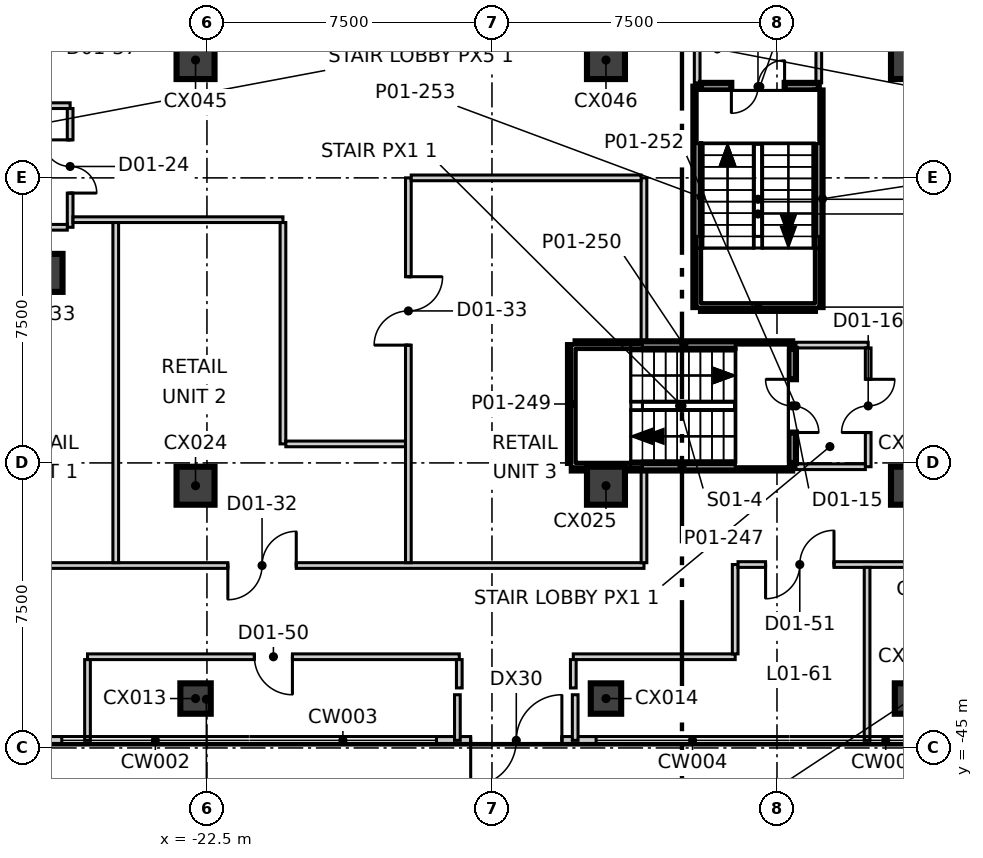
"""IFC4 building model, lengths in metres.
Left out: names, types, materials, properties, quantities, classifications, styles, units other than length and angle.
Written with IfcOpenShell. Run it as: python <this file> out.ifc"""

import sys

from ifc_helpers import new_model, si_unit, direction, frame, frame_2d, origin, origin_2d, place, context, subcontext, project, spatial, rectangle, extrude, element, fill, save


model = new_model("IFC4")
c1 = context("Model", 3, precision=1e-05, world=origin(), true_north=direction((0.0, 1.0)))
c2 = subcontext(c1, "Body", "Model", "MODEL_VIEW")
j1 = project(units=[si_unit("LENGTHUNIT", "METRE"), si_unit("PLANEANGLEUNIT", "RADIAN")], contexts=[c1])
p1 = place(None, origin())
s1 = spatial("IfcSite", under=j1, at=p1, CompositionType="ELEMENT")
p2 = place(p1, origin())
s2 = spatial("IfcBuilding", under=s1, at=p2, CompositionType="ELEMENT")
p3 = place(p2, frame((0.0, 0.0, 8.5)))
s3 = spatial("IfcBuildingStorey", under=s2, at=p3, CompositionType="ELEMENT", Elevation=8.5)
for number, where, z_axis, x_axis in (
    (1, (-22.8, -43.7, -0.4), (0.0, 0.0, 1.0), (1.0, 0.0, 0.0)),
    (2, (-12.0, -43.7, -0.4), (0.0, 0.0, 1.0), (1.0, 0.0, 0.0)),
    (3, (-4.0, -43.7, -0.4), (0.0, 0.0, 1.0), (1.0, 0.0, 0.0)),
):
    element("IfcColumn", number, at=place(p3, frame(where, z_axis=z_axis, x_axis=x_axis)), inside=s3, PredefinedType="COLUMN", context=c2, shape_type="SweptSolid", body=[
        extrude(rectangle(XDim=0.8, YDim=0.8, at=origin_2d()), origin(), (0.0, 0.0, 1.0), 6.0),
    ])
for number, where, z_axis, x_axis in (
    (4, (-22.8, -38.1, -0.4), (0.0, 0.0, 1.0), (1.0, 0.0, 0.0)),
    (5, (-12.0, -38.1, -0.4), (0.0, 0.0, 1.0), (1.0, 0.0, 0.0)),
    (6, (-4.0, -38.1, -0.4), (0.0, 0.0, 1.0), (1.0, 0.0, 0.0)),
    (7, (-26.8, -32.5, -0.4), (0.0, 0.0, 1.0), (1.0, 0.0, 0.0)),
    (8, (-22.8, -26.9, -0.4), (0.0, 0.0, 1.0), (1.0, 0.0, 0.0)),
    (9, (-12.0, -26.9, -0.4), (0.0, 0.0, 1.0), (1.0, 0.0, 0.0)),
    (10, (-4.0, -26.9, -0.4), (0.0, 0.0, 1.0), (1.0, 0.0, 0.0)),
):
    element("IfcColumn", number, at=place(p3, frame(where, z_axis=z_axis, x_axis=x_axis)), inside=s3, PredefinedType="COLUMN", context=c2, shape_type="SweptSolid", body=[
        extrude(rectangle(XDim=1.0, YDim=1.0, at=origin_2d()), origin(), (0.0, 0.0, 1.0), 6.0),
    ])
p4 = place(p3, frame((-30.52, -44.8, 0.0), z_axis=(0.0, 0.0, 1.0), x_axis=(1.0, 0.0, 0.0)))
e11 = element("IfcWall", 11, at=p4, inside=s3, PredefinedType="ELEMENTEDWALL", context=c2, shape_type="SweptSolid", body=[
    extrude(rectangle(XDim=4.2, YDim=0.2, at=frame_2d((2.1, 0.0))), origin(), (0.0, 0.0, 1.0), 5.6),
])
p5 = place(p4, frame((0.9, 0.0, 0.0)))
e12 = element("IfcOpeningElement", 12, at=p5, cuts=e11, PredefinedType="OPENING", context=c2, shape_type="SweptSolid", body=[
    extrude(rectangle(XDim=2.4, YDim=2.4, at=frame_2d((1.2, 1.2))), frame((0.0, 0.11, 0.0), z_axis=(0.0, -1.0, 0.0), x_axis=(1.0, 0.0, 0.0)), (0.0, 0.0, 1.0), 0.22),
])
p6 = place(p3, frame((-16.46, -44.8, 0.0), z_axis=(0.0, 0.0, 1.0), x_axis=(1.0, 0.0, 0.0)))
e13 = element("IfcWall", 13, at=p6, inside=s3, PredefinedType="ELEMENTEDWALL", context=c2, shape_type="SweptSolid", body=[
    extrude(rectangle(XDim=4.2, YDim=0.2, at=frame_2d((2.1, 0.0))), origin(), (0.0, 0.0, 1.0), 5.6),
])
p7 = place(p6, frame((0.9, 0.0, 0.0)))
e14 = element("IfcOpeningElement", 14, at=p7, cuts=e13, PredefinedType="OPENING", context=c2, shape_type="SweptSolid", body=[
    extrude(rectangle(XDim=2.4, YDim=2.4, at=frame_2d((1.2, 1.2))), frame((0.0, 0.11, 0.0), z_axis=(0.0, -1.0, 0.0), x_axis=(1.0, 0.0, 0.0)), (0.0, 0.0, 1.0), 0.22),
])
p8 = place(p3, frame((-28.0, -28.1, 0.0), z_axis=(0.0, 0.0, 1.0), x_axis=(1.0, 0.0, 0.0)))
e15 = element("IfcWall", 15, at=p8, inside=s3, PredefinedType="PARTITIONING", context=c2, shape_type="SweptSolid", body=[
    extrude(rectangle(XDim=1.9, YDim=0.15, at=frame_2d((0.95, 0.0))), origin(), (0.0, 0.0, 1.0), 5.6),
])
p9 = place(p3, frame((-26.1, -31.3, 0.0), z_axis=(0.0, 0.0, 1.0), x_axis=(0.0, 1.0, 0.0)))
e16 = element("IfcWall", 16, at=p9, inside=s3, PredefinedType="PARTITIONING", context=c2, shape_type="SweptSolid", body=[
    extrude(rectangle(XDim=3.125, YDim=0.15, at=frame_2d((1.562, 0.0))), origin(), (0.0, 0.0, 1.0), 5.6),
])
p10 = place(p9, frame((0.9, 0.0, 0.0)))
e17 = element("IfcOpeningElement", 17, at=p10, cuts=e16, PredefinedType="OPENING", context=c2, shape_type="SweptSolid", body=[
    extrude(rectangle(XDim=1.4, YDim=2.1, at=frame_2d((0.7, 1.05))), frame((0.0, 0.085, 0.0), z_axis=(0.0, -1.0, 0.0), x_axis=(1.0, 0.0, 0.0)), (0.0, 0.0, 1.0), 0.17),
])
p11 = place(p3, frame((-28.0, -31.3, 0.0), z_axis=(0.0, 0.0, 1.0), x_axis=(1.0, 0.0, 0.0)))
e18 = element("IfcWall", 18, at=p11, inside=s3, PredefinedType="PARTITIONING", context=c2, shape_type="SweptSolid", body=[
    extrude(rectangle(XDim=1.825, YDim=0.15, at=frame_2d((0.913, 0.0))), origin(), (0.0, 0.0, 1.0), 5.6),
])
p12 = place(p3, frame((-9.6, -27.5, 0.0), z_axis=(0.0, 0.0, 1.0), x_axis=(0.0, 1.0, 0.0)))
e19 = element("IfcWall", 19, at=p12, inside=s3, PredefinedType="PARTITIONING", context=c2, shape_type="SweptSolid", body=[
    extrude(rectangle(XDim=1.9, YDim=0.15, at=frame_2d((0.95, 0.0))), origin(), (0.0, 0.0, 1.0), 5.6),
])
p13 = place(p3, frame((-6.4, -27.5, 0.0), z_axis=(0.0, 0.0, 1.0), x_axis=(0.0, 1.0, 0.0)))
e20 = element("IfcWall", 20, at=p13, inside=s3, PredefinedType="PARTITIONING", context=c2, shape_type="SweptSolid", body=[
    extrude(rectangle(XDim=1.825, YDim=0.15, at=frame_2d((0.913, 0.0))), origin(), (0.0, 0.0, 1.0), 5.6),
])
p14 = place(p3, frame((-7.0, -34.4, 0.0), z_axis=(0.0, 0.0, 1.0), x_axis=(1.0, 0.0, 0.0)))
e21 = element("IfcWall", 21, at=p14, inside=s3, PredefinedType="PARTITIONING", context=c2, shape_type="SweptSolid", body=[
    extrude(rectangle(XDim=1.9, YDim=0.15, at=frame_2d((0.95, 0.0))), origin(), (0.0, 0.0, 1.0), 5.6),
])
p15 = place(p3, frame((-5.1, -37.6, 0.0), z_axis=(0.0, 0.0, 1.0), x_axis=(0.0, 1.0, 0.0)))
e22 = element("IfcWall", 22, at=p15, inside=s3, PredefinedType="PARTITIONING", context=c2, shape_type="SweptSolid", body=[
    extrude(rectangle(XDim=3.125, YDim=0.15, at=frame_2d((1.562, 0.0))), origin(), (0.0, 0.0, 1.0), 5.6),
])
p16 = place(p15, frame((0.9, 0.0, 0.0)))
e23 = element("IfcOpeningElement", 23, at=p16, cuts=e22, PredefinedType="OPENING", context=c2, shape_type="SweptSolid", body=[
    extrude(rectangle(XDim=1.4, YDim=2.1, at=frame_2d((0.7, 1.05))), frame((0.0, 0.085, 0.0), z_axis=(0.0, -1.0, 0.0), x_axis=(1.0, 0.0, 0.0)), (0.0, 0.0, 1.0), 0.17),
])
p17 = place(p3, frame((-7.0, -37.6, 0.0), z_axis=(0.0, 0.0, 1.0), x_axis=(1.0, 0.0, 0.0)))
e24 = element("IfcWall", 24, at=p17, inside=s3, PredefinedType="PARTITIONING", context=c2, shape_type="SweptSolid", body=[
    extrude(rectangle(XDim=1.825, YDim=0.15, at=frame_2d((0.913, 0.0))), origin(), (0.0, 0.0, 1.0), 5.6),
])
p18 = place(p3, frame((-25.643, -42.6, 0.0), z_axis=(0.0, 0.0, 1.0), x_axis=(1.0, 0.0, 0.0)))
e25 = element("IfcWall", 25, at=p18, inside=s3, PredefinedType="PARTITIONING", context=c2, shape_type="SweptSolid", body=[
    extrude(rectangle(XDim=9.783, YDim=0.15, at=frame_2d((4.892, 0.0))), origin(), (0.0, 0.0, 1.0), 5.6),
])
p19 = place(p18, frame((4.392, 0.0, 0.0)))
e26 = element("IfcOpeningElement", 26, at=p19, cuts=e25, PredefinedType="OPENING", context=c2, shape_type="SweptSolid", body=[
    extrude(rectangle(XDim=1.0, YDim=2.1, at=frame_2d((0.5, 1.05))), frame((0.0, 0.085, 0.0), z_axis=(0.0, -1.0, 0.0), x_axis=(1.0, 0.0, 0.0)), (0.0, 0.0, 1.0), 0.17),
])
p20 = place(p3, frame((-12.86, -42.6, 0.0), z_axis=(0.0, 0.0, 1.0), x_axis=(1.0, 0.0, 0.0)))
e27 = element("IfcWall", 27, at=p20, inside=s3, PredefinedType="PARTITIONING", context=c2, shape_type="SweptSolid", body=[
    extrude(rectangle(XDim=4.26, YDim=0.15, at=frame_2d((2.13, 0.0))), origin(), (0.0, 0.0, 1.0), 5.6),
])
p21 = place(p3, frame((-31.3, -40.2, 0.0), z_axis=(0.0, 0.0, 1.0), x_axis=(1.0, 0.0, 0.0)))
e28 = element("IfcWall", 28, at=p21, inside=s3, PredefinedType="PARTITIONING", context=c2, shape_type="SweptSolid", body=[
    extrude(rectangle(XDim=20.3, YDim=0.15, at=frame_2d((10.15, 0.0))), origin(), (0.0, 0.0, 1.0), 5.6),
])
p22 = place(p21, frame((9.35, 0.0, 0.0)))
e29 = element("IfcOpeningElement", 29, at=p22, cuts=e28, PredefinedType="OPENING", context=c2, shape_type="SweptSolid", body=[
    extrude(rectangle(XDim=1.8, YDim=2.1, at=frame_2d((0.9, 1.05))), frame((0.0, 0.085, 0.0), z_axis=(0.0, -1.0, 0.0), x_axis=(1.0, 0.0, 0.0)), (0.0, 0.0, 1.0), 0.17),
])
p23 = place(p3, frame((-26.025, -31.1, 0.0), z_axis=(0.0, 0.0, 1.0), x_axis=(1.0, 0.0, 0.0)))
e30 = element("IfcWall", 30, at=p23, inside=s3, PredefinedType="PARTITIONING", context=c2, shape_type="SweptSolid", body=[
    extrude(rectangle(XDim=5.525, YDim=0.15, at=frame_2d((2.762, 0.0))), origin(), (0.0, 0.0, 1.0), 5.6),
])
p24 = place(p3, frame((-25.643, -44.8, 0.0), z_axis=(0.0, 0.0, 1.0), x_axis=(0.0, 1.0, 0.0)))
e31 = element("IfcWall", 31, at=p24, inside=s3, PredefinedType="PARTITIONING", context=c2, shape_type="SweptSolid", body=[
    extrude(rectangle(XDim=2.125, YDim=0.15, at=frame_2d((1.062, 0.0))), origin(), (0.0, 0.0, 1.0), 5.6),
])
p25 = place(p3, frame((-15.86, -43.421, 0.0), z_axis=(0.0, 0.0, 1.0), x_axis=(0.0, 1.0, 0.0)))
e32 = element("IfcWall", 32, at=p25, inside=s3, PredefinedType="PARTITIONING", context=c2, shape_type="SweptSolid", body=[
    extrude(rectangle(XDim=0.746, YDim=0.15, at=frame_2d((0.373, 0.0))), origin(), (0.0, 0.0, 1.0), 5.6),
])
p26 = place(p3, frame((-15.91, -44.8, 0.0), z_axis=(0.0, 0.0, 1.0), x_axis=(0.0, 1.0, 0.0)))
e33 = element("IfcWall", 33, at=p26, inside=s3, PredefinedType="PARTITIONING", context=c2, shape_type="SweptSolid", body=[
    extrude(rectangle(XDim=1.2, YDim=0.15, at=frame_2d((0.6, 0.0))), origin(), (0.0, 0.0, 1.0), 5.6),
])
p27 = place(p3, frame((-24.9, -40.125, 0.0), z_axis=(0.0, 0.0, 1.0), x_axis=(0.0, 1.0, 0.0)))
e34 = element("IfcWall", 34, at=p27, inside=s3, PredefinedType="PARTITIONING", context=c2, shape_type="SweptSolid", body=[
    extrude(rectangle(XDim=8.95, YDim=0.15, at=frame_2d((4.475, 0.0))), origin(), (0.0, 0.0, 1.0), 5.6),
])
p28 = place(p3, frame((-20.5, -37.0, 0.0), z_axis=(0.0, 0.0, 1.0), x_axis=(0.0, 1.0, 0.0)))
e35 = element("IfcWall", 35, at=p28, inside=s3, PredefinedType="PARTITIONING", context=c2, shape_type="SweptSolid", body=[
    extrude(rectangle(XDim=5.825, YDim=0.15, at=frame_2d((2.913, 0.0))), origin(), (0.0, 0.0, 1.0), 5.6),
])
p29 = place(p3, frame((-20.425, -37.0, 0.0), z_axis=(0.0, 0.0, 1.0), x_axis=(1.0, 0.0, 0.0)))
e36 = element("IfcWall", 36, at=p29, inside=s3, PredefinedType="PARTITIONING", context=c2, shape_type="SweptSolid", body=[
    extrude(rectangle(XDim=3.15, YDim=0.15, at=frame_2d((1.575, 0.0))), origin(), (0.0, 0.0, 1.0), 5.6),
])
p30 = place(p3, frame((-11.0, -40.125, 0.0), z_axis=(0.0, 0.0, 1.0), x_axis=(0.0, 1.0, 0.0)))
e37 = element("IfcWall", 37, at=p30, inside=s3, PredefinedType="PARTITIONING", context=c2, shape_type="SweptSolid", body=[
    extrude(rectangle(XDim=2.425, YDim=0.15, at=frame_2d((1.212, 0.0))), origin(), (0.0, 0.0, 1.0), 5.6),
])
p31 = place(p3, frame((-11.0, -34.3, 0.0), z_axis=(0.0, 0.0, 1.0), x_axis=(0.0, 1.0, 0.0)))
e38 = element("IfcWall", 38, at=p31, inside=s3, PredefinedType="PARTITIONING", context=c2, shape_type="SweptSolid", body=[
    extrude(rectangle(XDim=4.3, YDim=0.15, at=frame_2d((2.15, 0.0))), origin(), (0.0, 0.0, 1.0), 5.6),
])
p32 = place(p3, frame((-17.2, -40.125, 0.0), z_axis=(0.0, 0.0, 1.0), x_axis=(0.0, 1.0, 0.0)))
e39 = element("IfcWall", 39, at=p32, inside=s3, PredefinedType="PARTITIONING", context=c2, shape_type="SweptSolid", body=[
    extrude(rectangle(XDim=10.125, YDim=0.15, at=frame_2d((5.062, 0.0))), origin(), (0.0, 0.0, 1.0), 5.6),
])
p33 = place(p32, frame((5.724, 0.0, 0.0)))
e40 = element("IfcOpeningElement", 40, at=p33, cuts=e39, PredefinedType="OPENING", context=c2, shape_type="SweptSolid", body=[
    extrude(rectangle(XDim=1.8, YDim=2.1, at=frame_2d((0.9, 1.05))), frame((0.0, 0.085, 0.0), z_axis=(0.0, -1.0, 0.0), x_axis=(1.0, 0.0, 0.0)), (0.0, 0.0, 1.0), 0.17),
])
p34 = place(p3, frame((-17.125, -30.0, 0.0), z_axis=(0.0, 0.0, 1.0), x_axis=(1.0, 0.0, 0.0)))
e41 = element("IfcWall", 41, at=p34, inside=s3, PredefinedType="PARTITIONING", context=c2, shape_type="SweptSolid", body=[
    extrude(rectangle(XDim=6.05, YDim=0.15, at=frame_2d((3.025, 0.0))), origin(), (0.0, 0.0, 1.0), 5.6),
])
p35 = place(p3, frame((-12.81, -44.8, 0.0), z_axis=(0.0, 0.0, 1.0), x_axis=(0.0, 1.0, 0.0)))
e42 = element("IfcWall", 42, at=p35, inside=s3, PredefinedType="PARTITIONING", context=c2, shape_type="SweptSolid", body=[
    extrude(rectangle(XDim=1.2, YDim=0.15, at=frame_2d((0.6, 0.0))), origin(), (0.0, 0.0, 1.0), 5.6),
])
p36 = place(p3, frame((-12.86, -43.421, 0.0), z_axis=(0.0, 0.0, 1.0), x_axis=(0.0, 1.0, 0.0)))
e43 = element("IfcWall", 43, at=p36, inside=s3, PredefinedType="PARTITIONING", context=c2, shape_type="SweptSolid", body=[
    extrude(rectangle(XDim=0.746, YDim=0.15, at=frame_2d((0.373, 0.0))), origin(), (0.0, 0.0, 1.0), 5.6),
])
p37 = place(p3, frame((-8.6, -42.525, 0.0), z_axis=(0.0, 0.0, 1.0), x_axis=(0.0, 1.0, 0.0)))
e44 = element("IfcWall", 44, at=p37, inside=s3, PredefinedType="PARTITIONING", context=c2, shape_type="SweptSolid", body=[
    extrude(rectangle(XDim=2.351, YDim=0.15, at=frame_2d((1.175, 0.0))), origin(), (0.0, 0.0, 1.0), 5.6),
])
p38 = place(p3, frame((-8.525, -40.174, 0.0), z_axis=(0.0, 0.0, 1.0), x_axis=(1.0, 0.0, 0.0)))
e45 = element("IfcWall", 45, at=p38, inside=s3, PredefinedType="PARTITIONING", context=c2, shape_type="SweptSolid", body=[
    extrude(rectangle(XDim=17.125, YDim=0.15, at=frame_2d((8.562, 0.0))), origin(), (0.0, 0.0, 1.0), 5.6),
])
p39 = place(p38, frame((0.725, 0.0, 0.0)))
e46 = element("IfcOpeningElement", 46, at=p39, cuts=e45, PredefinedType="OPENING", context=c2, shape_type="SweptSolid", body=[
    extrude(rectangle(XDim=1.8, YDim=2.1, at=frame_2d((0.9, 1.05))), frame((0.0, 0.085, 0.0), z_axis=(0.0, -1.0, 0.0), x_axis=(1.0, 0.0, 0.0)), (0.0, 0.0, 1.0), 0.17),
])
p40 = place(p38, frame((7.625, 0.0, 0.0)))
e47 = element("IfcOpeningElement", 47, at=p40, cuts=e45, PredefinedType="OPENING", context=c2, shape_type="SweptSolid", body=[
    extrude(rectangle(XDim=1.8, YDim=2.1, at=frame_2d((0.9, 1.05))), frame((0.0, 0.085, 0.0), z_axis=(0.0, -1.0, 0.0), x_axis=(1.0, 0.0, 0.0)), (0.0, 0.0, 1.0), 0.17),
])
p41 = place(p3, frame((-5.129, -44.8, 0.0), z_axis=(0.0, 0.0, 1.0), x_axis=(0.0, 1.0, 0.0)))
e48 = element("IfcWall", 48, at=p41, inside=s3, PredefinedType="PARTITIONING", context=c2, shape_type="SweptSolid", body=[
    extrude(rectangle(XDim=4.551, YDim=0.15, at=frame_2d((2.275, 0.0))), origin(), (0.0, 0.0, 1.0), 5.6),
])
p42 = place(p3, frame((-12.9, -37.6, 0.0), z_axis=(0.0, 0.0, 1.0), x_axis=(1.0, 0.0, 0.0)))
e49 = element("IfcWall", 49, at=p42, inside=s3, PredefinedType="SOLIDWALL", context=c2, shape_type="SweptSolid", body=[
    extrude(rectangle(XDim=5.8, YDim=0.2, at=frame_2d((2.9, 0.0))), origin(), (0.0, 0.0, 1.0), 5.6),
])
p43 = place(p3, frame((-12.9, -37.5, 0.0), z_axis=(0.0, 0.0, 1.0), x_axis=(0.0, 1.0, 0.0)))
e50 = element("IfcWall", 50, at=p43, inside=s3, PredefinedType="SOLIDWALL", context=c2, shape_type="SweptSolid", body=[
    extrude(rectangle(XDim=3.1, YDim=0.2, at=frame_2d((1.55, 0.0))), origin(), (0.0, 0.0, 1.0), 5.6),
])
p44 = place(p3, frame((-12.8, -34.4, 0.0), z_axis=(0.0, 0.0, 1.0), x_axis=(1.0, 0.0, 0.0)))
e51 = element("IfcWall", 51, at=p44, inside=s3, PredefinedType="SOLIDWALL", context=c2, shape_type="SweptSolid", body=[
    extrude(rectangle(XDim=5.7, YDim=0.2, at=frame_2d((2.85, 0.0))), origin(), (0.0, 0.0, 1.0), 5.6),
])
p45 = place(p3, frame((-7.1, -37.5, 0.0), z_axis=(0.0, 0.0, 1.0), x_axis=(0.0, 1.0, 0.0)))
e52 = element("IfcWall", 52, at=p45, inside=s3, PredefinedType="SOLIDWALL", context=c2, shape_type="SweptSolid", body=[
    extrude(rectangle(XDim=3.0, YDim=0.2, at=frame_2d((1.5, 0.0))), origin(), (0.0, 0.0, 1.0), 5.6),
])
p46 = place(p45, frame((0.8, 0.0, 0.0)))
e53 = element("IfcOpeningElement", 53, at=p46, cuts=e52, PredefinedType="OPENING", context=c2, shape_type="SweptSolid", body=[
    extrude(rectangle(XDim=1.4, YDim=2.1, at=frame_2d((0.7, 1.05))), frame((0.0, 0.11, 0.0), z_axis=(0.0, -1.0, 0.0), x_axis=(1.0, 0.0, 0.0)), (0.0, 0.0, 1.0), 0.22),
])
p47 = place(p3, frame((-9.6, -33.4, 0.0), z_axis=(0.0, 0.0, 1.0), x_axis=(0.0, 1.0, 0.0)))
e54 = element("IfcWall", 54, at=p47, inside=s3, PredefinedType="SOLIDWALL", context=c2, shape_type="SweptSolid", body=[
    extrude(rectangle(XDim=5.8, YDim=0.2, at=frame_2d((2.9, 0.0))), origin(), (0.0, 0.0, 1.0), 5.6),
])
p48 = place(p3, frame((-9.5, -27.6, 0.0), z_axis=(0.0, 0.0, 1.0), x_axis=(1.0, 0.0, 0.0)))
e55 = element("IfcWall", 55, at=p48, inside=s3, PredefinedType="SOLIDWALL", context=c2, shape_type="SweptSolid", body=[
    extrude(rectangle(XDim=3.1, YDim=0.2, at=frame_2d((1.55, 0.0))), origin(), (0.0, 0.0, 1.0), 5.6),
])
p49 = place(p48, frame((0.8, 0.0, 0.0)))
e56 = element("IfcOpeningElement", 56, at=p49, cuts=e55, PredefinedType="OPENING", context=c2, shape_type="SweptSolid", body=[
    extrude(rectangle(XDim=1.4, YDim=2.1, at=frame_2d((0.7, 1.05))), frame((0.0, 0.11, 0.0), z_axis=(0.0, -1.0, 0.0), x_axis=(1.0, 0.0, 0.0)), (0.0, 0.0, 1.0), 0.22),
])
p50 = place(p3, frame((-6.4, -33.4, 0.0), z_axis=(0.0, 0.0, 1.0), x_axis=(0.0, 1.0, 0.0)))
e57 = element("IfcWall", 57, at=p50, inside=s3, PredefinedType="SOLIDWALL", context=c2, shape_type="SweptSolid", body=[
    extrude(rectangle(XDim=5.7, YDim=0.2, at=frame_2d((2.85, 0.0))), origin(), (0.0, 0.0, 1.0), 5.6),
])
p51 = place(p3, frame((-9.5, -33.4, 0.0), z_axis=(0.0, 0.0, 1.0), x_axis=(1.0, 0.0, 0.0)))
e58 = element("IfcWall", 58, at=p51, inside=s3, PredefinedType="SOLIDWALL", context=c2, shape_type="SweptSolid", body=[
    extrude(rectangle(XDim=3.0, YDim=0.2, at=frame_2d((1.5, 0.0))), origin(), (0.0, 0.0, 1.0), 5.6),
])
p52 = place(p7, frame((2.4, 0.0, 0.0), z_axis=(0.0, 0.0, 1.0), x_axis=(-1.0, 0.0, 0.0)))
e59 = element("IfcDoor", 59, at=p52, inside=s3, OperationType="DOUBLE_DOOR_SINGLE_SWING", PredefinedType="DOOR", context=c2, shape_type="SweptSolid", body=[
    extrude(rectangle(XDim=2.4, YDim=2.4, at=frame_2d((1.2, 1.2))), frame((0.0, 0.025, 0.0), z_axis=(0.0, -1.0, 0.0), x_axis=(1.0, 0.0, 0.0)), (0.0, 0.0, 1.0), 0.05),
])
fill(e14, e59)
p53 = place(p46, origin())
e60 = element("IfcDoor", 60, at=p53, inside=s3, OperationType="DOUBLE_DOOR_SINGLE_SWING", PredefinedType="DOOR", context=c2, shape_type="SweptSolid", body=[
    extrude(rectangle(XDim=1.4, YDim=2.1, at=frame_2d((0.7, 1.05))), frame((0.0, 0.025, 0.0), z_axis=(0.0, -1.0, 0.0), x_axis=(1.0, 0.0, 0.0)), (0.0, 0.0, 1.0), 0.05),
])
fill(e53, e60)
p54 = place(p16, origin())
e61 = element("IfcDoor", 61, at=p54, inside=s3, OperationType="DOUBLE_DOOR_SINGLE_SWING", PredefinedType="DOOR", context=c2, shape_type="SweptSolid", body=[
    extrude(rectangle(XDim=1.4, YDim=2.1, at=frame_2d((0.7, 1.05))), frame((0.0, 0.025, 0.0), z_axis=(0.0, -1.0, 0.0), x_axis=(1.0, 0.0, 0.0)), (0.0, 0.0, 1.0), 0.05),
])
fill(e23, e61)
p55 = place(p10, origin())
e62 = element("IfcDoor", 62, at=p55, inside=s3, OperationType="DOUBLE_DOOR_SINGLE_SWING", PredefinedType="DOOR", context=c2, shape_type="SweptSolid", body=[
    extrude(rectangle(XDim=1.4, YDim=2.1, at=frame_2d((0.7, 1.05))), frame((0.0, 0.025, 0.0), z_axis=(0.0, -1.0, 0.0), x_axis=(1.0, 0.0, 0.0)), (0.0, 0.0, 1.0), 0.05),
])
fill(e17, e62)
p56 = place(p49, origin())
e63 = element("IfcDoor", 63, at=p56, inside=s3, OperationType="DOUBLE_DOOR_SINGLE_SWING", PredefinedType="DOOR", context=c2, shape_type="SweptSolid", body=[
    extrude(rectangle(XDim=1.4, YDim=2.1, at=frame_2d((0.7, 1.05))), frame((0.0, 0.025, 0.0), z_axis=(0.0, -1.0, 0.0), x_axis=(1.0, 0.0, 0.0)), (0.0, 0.0, 1.0), 0.05),
])
fill(e56, e63)
p57 = place(p22, origin())
e64 = element("IfcDoor", 64, at=p57, inside=s3, OperationType="DOUBLE_DOOR_SINGLE_SWING", PredefinedType="DOOR", context=c2, shape_type="SweptSolid", body=[
    extrude(rectangle(XDim=1.8, YDim=2.1, at=frame_2d((0.9, 1.05))), frame((0.0, 0.025, 0.0), z_axis=(0.0, -1.0, 0.0), x_axis=(1.0, 0.0, 0.0)), (0.0, 0.0, 1.0), 0.05),
])
fill(e29, e64)
p58 = place(p33, origin())
e65 = element("IfcDoor", 65, at=p58, inside=s3, OperationType="DOUBLE_DOOR_SINGLE_SWING", PredefinedType="DOOR", context=c2, shape_type="SweptSolid", body=[
    extrude(rectangle(XDim=1.8, YDim=2.1, at=frame_2d((0.9, 1.05))), frame((0.0, 0.025, 0.0), z_axis=(0.0, -1.0, 0.0), x_axis=(1.0, 0.0, 0.0)), (0.0, 0.0, 1.0), 0.05),
])
fill(e40, e65)
p59 = place(p19, origin())
e66 = element("IfcDoor", 66, at=p59, inside=s3, OperationType="SINGLE_SWING_RIGHT", PredefinedType="DOOR", context=c2, shape_type="SweptSolid", body=[
    extrude(rectangle(XDim=1.0, YDim=2.1, at=frame_2d((0.5, 1.05))), frame((0.0, 0.025, 0.0), z_axis=(0.0, -1.0, 0.0), x_axis=(1.0, 0.0, 0.0)), (0.0, 0.0, 1.0), 0.05),
])
fill(e26, e66)
p60 = place(p39, origin())
e67 = element("IfcDoor", 67, at=p60, inside=s3, OperationType="DOUBLE_DOOR_SINGLE_SWING", PredefinedType="DOOR", context=c2, shape_type="SweptSolid", body=[
    extrude(rectangle(XDim=1.8, YDim=2.1, at=frame_2d((0.9, 1.05))), frame((0.0, 0.025, 0.0), z_axis=(0.0, -1.0, 0.0), x_axis=(1.0, 0.0, 0.0)), (0.0, 0.0, 1.0), 0.05),
])
fill(e46, e67)
save(model, sys.argv[1])
